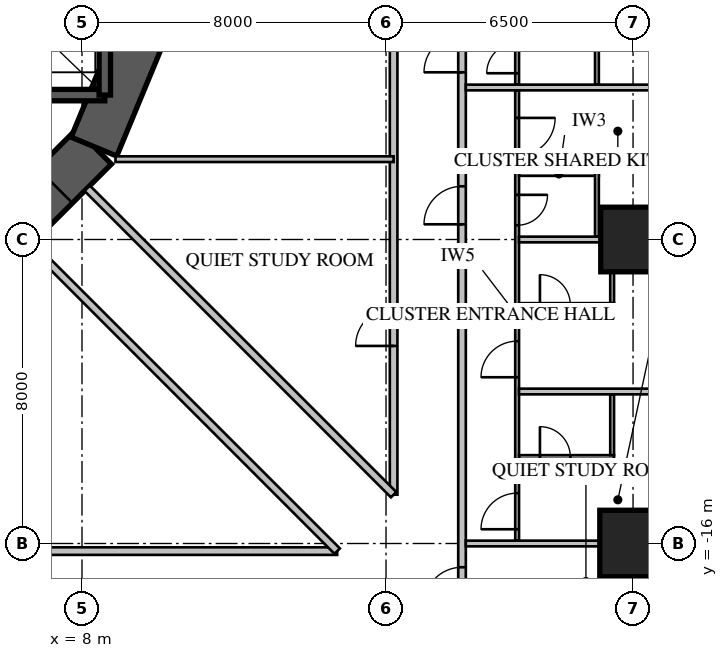
"""IFC4 building model, lengths in metres.
Left out: names, types, materials, properties, quantities, classifications, styles, units other than length and angle.
Written with IfcOpenShell. Run it as: python <this file> out.ifc"""

import sys

from ifc_helpers import new_model, si_unit, direction, frame, frame_2d, origin, origin_2d, place, context, subcontext, project, spatial, rectangle, extrude, element, fill, save


model = new_model("IFC4")
c1 = context("Model", 3, precision=1e-05, world=origin(), true_north=direction((0.0, 1.0)))
c2 = subcontext(c1, "Body", "Model", "MODEL_VIEW")
j1 = project(units=[si_unit("LENGTHUNIT", "METRE"), si_unit("PLANEANGLEUNIT", "RADIAN")], contexts=[c1])
p1 = place(None, origin())
s1 = spatial("IfcSite", under=j1, at=p1, CompositionType="ELEMENT")
p2 = place(p1, origin())
s2 = spatial("IfcBuilding", under=s1, at=p2, CompositionType="ELEMENT")
p3 = place(p2, frame((0.0, 0.0, 42.95)))
s3 = spatial("IfcBuildingStorey", under=s2, at=p3, CompositionType="ELEMENT", Elevation=42.95)
p4 = place(p3, frame((5.556, -8.315, 0.0), z_axis=(0.0, 0.0, 1.0), x_axis=(0.707106781187, 0.707106781187, 0.0)))
e1 = element("IfcWall", 1, at=p4, inside=s3, PredefinedType="SHEAR", context=c2, shape_type="SweptSolid", body=[
    extrude(rectangle(XDim=3.902, YDim=1.3, at=frame_2d((1.951, 0.0))), origin(), (0.0, 0.0, 1.0), 3.85),
])
p5 = place(p4, frame((1.451, 0.0, 0.0)))
e2 = element("IfcOpeningElement", 2, at=p5, cuts=e1, PredefinedType="OPENING", context=c2, shape_type="SweptSolid", body=[
    extrude(rectangle(XDim=1.0, YDim=2.1, at=frame_2d((0.5, 1.05))), frame((0.0, 0.67, 0.0), z_axis=(0.0, -1.0, 0.0), x_axis=(1.0, 0.0, 0.0)), (0.0, 0.0, 1.0), 1.34),
])
p6 = place(p3, frame((8.315, -5.556, 0.0), z_axis=(0.0, 0.0, 1.0), x_axis=(0.382690736062, 0.923876507187, 0.0)))
e3 = element("IfcWall", 3, at=p6, inside=s3, PredefinedType="SHEAR", context=c2, shape_type="SweptSolid", body=[
    extrude(rectangle(XDim=3.902, YDim=1.3, at=frame_2d((1.951, 0.0))), origin(), (0.0, 0.0, 1.0), 3.85),
])
p7 = place(p3, frame((5.55, -4.2, 0.0), z_axis=(0.0, 0.0, 1.0), x_axis=(1.0, 0.0, 0.0)))
e4 = element("IfcWall", 4, at=p7, inside=s3, PredefinedType="SHEAR", context=c2, shape_type="SweptSolid", body=[
    extrude(rectangle(XDim=3.05, YDim=0.3, at=frame_2d((1.525, 0.0))), origin(), (0.0, 0.0, 1.0), 3.85),
])
p8 = place(p3, frame((8.6, -4.2, 0.0), z_axis=(0.0, 0.0, 1.0), x_axis=(0.0, 1.0, 0.0)))
e5 = element("IfcWall", 5, at=p8, inside=s3, PredefinedType="SHEAR", context=c2, shape_type="SweptSolid", body=[
    extrude(rectangle(XDim=8.4, YDim=0.3, at=frame_2d((4.2, 0.0))), origin(), (0.0, 0.0, 1.0), 3.85),
])
p9 = place(p3, frame((22.5, -16.0, 0.0), z_axis=(0.0, 0.0, 1.0), x_axis=(1.0, 0.0, 0.0)))
e6 = element("IfcColumn", 6, at=p9, inside=s3, PredefinedType="COLUMN", context=c2, shape_type="SweptSolid", body=[
    extrude(rectangle(XDim=1.75, YDim=1.75, at=origin_2d()), origin(), (0.0, 0.0, 1.0), 3.85),
])
p10 = place(p3, frame((22.5, -8.0, 0.0), z_axis=(0.0, 0.0, 1.0), x_axis=(1.0, 0.0, 0.0)))
e7 = element("IfcColumn", 7, at=p10, inside=s3, PredefinedType="COLUMN", context=c2, shape_type="SweptSolid", body=[
    extrude(rectangle(XDim=1.7, YDim=1.7, at=origin_2d()), origin(), (0.0, 0.0, 1.0), 3.85),
])
p11 = place(p3, frame((18.0, -18.0, 0.0), z_axis=(0.0, 0.0, 1.0), x_axis=(0.0, 1.0, 0.0)))
e8 = element("IfcWall", 8, at=p11, inside=s3, PredefinedType="PARTITIONING", context=c2, shape_type="SweptSolid", body=[
    extrude(rectangle(XDim=36.0, YDim=0.2, at=frame_2d((18.0, 0.0))), origin(), (0.0, 0.0, 1.0), 3.65),
])
p12 = place(p11, frame((10.4, 0.0, 0.0)))
e9 = element("IfcOpeningElement", 9, at=p12, cuts=e8, PredefinedType="OPENING", context=c2, shape_type="SweptSolid", body=[
    extrude(rectangle(XDim=1.0, YDim=2.1, at=frame_2d((0.5, 1.05))), frame((0.0, 0.12, 0.0), z_axis=(0.0, -1.0, 0.0), x_axis=(1.0, 0.0, 0.0)), (0.0, 0.0, 1.0), 0.24),
])
p13 = place(p11, frame((14.4, 0.0, 0.0)))
e10 = element("IfcOpeningElement", 10, at=p13, cuts=e8, PredefinedType="OPENING", context=c2, shape_type="SweptSolid", body=[
    extrude(rectangle(XDim=1.0, YDim=2.1, at=frame_2d((0.5, 1.05))), frame((0.0, 0.12, 0.0), z_axis=(0.0, -1.0, 0.0), x_axis=(1.0, 0.0, 0.0)), (0.0, 0.0, 1.0), 0.24),
])
p14 = place(p11, frame((0.375, 0.0, 0.0)))
e11 = element("IfcOpeningElement", 11, at=p14, cuts=e8, PredefinedType="OPENING", context=c2, shape_type="SweptSolid", body=[
    extrude(rectangle(XDim=1.0, YDim=2.1, at=frame_2d((0.5, 1.05))), frame((0.0, 0.12, 0.0), z_axis=(0.0, -1.0, 0.0), x_axis=(1.0, 0.0, 0.0)), (0.0, 0.0, 1.0), 0.24),
])
p15 = place(p11, frame((34.375, 0.0, 0.0)))
e12 = element("IfcOpeningElement", 12, at=p15, cuts=e8, PredefinedType="OPENING", context=c2, shape_type="SweptSolid", body=[
    extrude(rectangle(XDim=0.95, YDim=2.1, at=frame_2d((0.475, 1.05))), frame((0.0, 0.12, 0.0), z_axis=(0.0, -1.0, 0.0), x_axis=(1.0, 0.0, 0.0)), (0.0, 0.0, 1.0), 0.24),
])
p16 = place(p3, frame((19.45, -15.925, 0.0), z_axis=(0.0, 0.0, 1.0), x_axis=(0.0, 1.0, 0.0)))
e13 = element("IfcWall", 13, at=p16, inside=s3, PredefinedType="PARTITIONING", context=c2, shape_type="SweptSolid", body=[
    extrude(rectangle(XDim=11.85, YDim=0.1, at=frame_2d((5.925, 0.0))), origin(), (0.0, 0.0, 1.0), 3.65),
])
p17 = place(p16, frame((10.125, 0.0, 0.0)))
e14 = element("IfcOpeningElement", 14, at=p17, cuts=e13, PredefinedType="OPENING", context=c2, shape_type="SweptSolid", body=[
    extrude(rectangle(XDim=1.0, YDim=2.1, at=frame_2d((0.5, 1.05))), frame((0.0, 0.07, 0.0), z_axis=(0.0, -1.0, 0.0), x_axis=(1.0, 0.0, 0.0)), (0.0, 0.0, 1.0), 0.14),
])
p18 = place(p16, frame((8.3, 0.0, 0.0)))
e15 = element("IfcOpeningElement", 15, at=p18, cuts=e13, PredefinedType="OPENING", context=c2, shape_type="SweptSolid", body=[
    extrude(rectangle(XDim=0.8, YDim=2.1, at=frame_2d((0.4, 1.05))), frame((0.0, 0.07, 0.0), z_axis=(0.0, -1.0, 0.0), x_axis=(1.0, 0.0, 0.0)), (0.0, 0.0, 1.0), 0.14),
])
p19 = place(p16, frame((0.3, 0.0, 0.0)))
e16 = element("IfcOpeningElement", 16, at=p19, cuts=e13, PredefinedType="OPENING", context=c2, shape_type="SweptSolid", body=[
    extrude(rectangle(XDim=0.95, YDim=2.1, at=frame_2d((0.475, 1.05))), frame((0.0, 0.07, 0.0), z_axis=(0.0, -1.0, 0.0), x_axis=(1.0, 0.0, 0.0)), (0.0, 0.0, 1.0), 0.14),
])
p20 = place(p16, frame((4.3, 0.0, 0.0)))
e17 = element("IfcOpeningElement", 17, at=p20, cuts=e13, PredefinedType="OPENING", context=c2, shape_type="SweptSolid", body=[
    extrude(rectangle(XDim=0.95, YDim=2.1, at=frame_2d((0.475, 1.05))), frame((0.0, 0.07, 0.0), z_axis=(0.0, -1.0, 0.0), x_axis=(1.0, 0.0, 0.0)), (0.0, 0.0, 1.0), 0.14),
])
p21 = place(p3, frame((19.5, -6.275, 0.0), z_axis=(0.0, 0.0, 1.0), x_axis=(1.0, 0.0, 0.0)))
e18 = element("IfcWall", 18, at=p21, inside=s3, PredefinedType="PARTITIONING", context=c2, shape_type="SweptSolid", body=[
    extrude(rectangle(XDim=2.1, YDim=0.1, at=frame_2d((1.05, 0.0))), origin(), (0.0, 0.0, 1.0), 3.65),
])
p22 = place(p3, frame((21.55, -7.925, 0.0), z_axis=(0.0, 0.0, 1.0), x_axis=(0.0, 1.0, 0.0)))
e19 = element("IfcWall", 19, at=p22, inside=s3, PredefinedType="PARTITIONING", context=c2, shape_type="SweptSolid", body=[
    extrude(rectangle(XDim=1.7, YDim=0.1, at=frame_2d((0.85, 0.0))), origin(), (0.0, 0.0, 1.0), 3.65),
])
p23 = place(p3, frame((19.45, -3.925, 0.0), z_axis=(0.0, 0.0, 1.0), x_axis=(0.0, 1.0, 0.0)))
e20 = element("IfcWall", 20, at=p23, inside=s3, PredefinedType="PARTITIONING", context=c2, shape_type="SweptSolid", body=[
    extrude(rectangle(XDim=19.85, YDim=0.1, at=frame_2d((9.925, 0.0))), origin(), (0.0, 0.0, 1.0), 3.65),
])
p24 = place(p23, frame((2.125, 0.0, 0.0)))
e21 = element("IfcOpeningElement", 21, at=p24, cuts=e20, PredefinedType="OPENING", context=c2, shape_type="SweptSolid", body=[
    extrude(rectangle(XDim=1.0, YDim=2.1, at=frame_2d((0.5, 1.05))), frame((0.0, 0.07, 0.0), z_axis=(0.0, -1.0, 0.0), x_axis=(1.0, 0.0, 0.0)), (0.0, 0.0, 1.0), 0.14),
])
p25 = place(p23, frame((0.3, 0.0, 0.0)))
e22 = element("IfcOpeningElement", 22, at=p25, cuts=e20, PredefinedType="OPENING", context=c2, shape_type="SweptSolid", body=[
    extrude(rectangle(XDim=0.8, YDim=2.1, at=frame_2d((0.4, 1.05))), frame((0.0, 0.07, 0.0), z_axis=(0.0, -1.0, 0.0), x_axis=(1.0, 0.0, 0.0)), (0.0, 0.0, 1.0), 0.14),
])
p26 = place(p23, frame((4.3, 0.0, 0.0)))
e23 = element("IfcOpeningElement", 23, at=p26, cuts=e20, PredefinedType="OPENING", context=c2, shape_type="SweptSolid", body=[
    extrude(rectangle(XDim=0.95, YDim=2.1, at=frame_2d((0.475, 1.05))), frame((0.0, 0.07, 0.0), z_axis=(0.0, -1.0, 0.0), x_axis=(1.0, 0.0, 0.0)), (0.0, 0.0, 1.0), 0.14),
])
p27 = place(p23, frame((8.3, 0.0, 0.0)))
e24 = element("IfcOpeningElement", 24, at=p27, cuts=e20, PredefinedType="OPENING", context=c2, shape_type="SweptSolid", body=[
    extrude(rectangle(XDim=0.95, YDim=2.1, at=frame_2d((0.475, 1.05))), frame((0.0, 0.07, 0.0), z_axis=(0.0, -1.0, 0.0), x_axis=(1.0, 0.0, 0.0)), (0.0, 0.0, 1.0), 0.14),
])
p28 = place(p23, frame((12.3, 0.0, 0.0)))
e25 = element("IfcOpeningElement", 25, at=p28, cuts=e20, PredefinedType="OPENING", context=c2, shape_type="SweptSolid", body=[
    extrude(rectangle(XDim=0.95, YDim=2.1, at=frame_2d((0.475, 1.05))), frame((0.0, 0.07, 0.0), z_axis=(0.0, -1.0, 0.0), x_axis=(1.0, 0.0, 0.0)), (0.0, 0.0, 1.0), 0.14),
])
p29 = place(p23, frame((16.3, 0.0, 0.0)))
e26 = element("IfcOpeningElement", 26, at=p29, cuts=e20, PredefinedType="OPENING", context=c2, shape_type="SweptSolid", body=[
    extrude(rectangle(XDim=0.95, YDim=2.1, at=frame_2d((0.475, 1.05))), frame((0.0, 0.07, 0.0), z_axis=(0.0, -1.0, 0.0), x_axis=(1.0, 0.0, 0.0)), (0.0, 0.0, 1.0), 0.14),
])
p30 = place(p3, frame((21.55, -3.925, 0.0), z_axis=(0.0, 0.0, 1.0), x_axis=(0.0, 1.0, 0.0)))
e27 = element("IfcWall", 27, at=p30, inside=s3, PredefinedType="PARTITIONING", context=c2, shape_type="SweptSolid", body=[
    extrude(rectangle(XDim=1.7, YDim=0.1, at=frame_2d((0.85, 0.0))), origin(), (0.0, 0.0, 1.0), 3.65),
])
p31 = place(p3, frame((18.1, -16.0, 0.0), z_axis=(0.0, 0.0, 1.0), x_axis=(1.0, 0.0, 0.0)))
e28 = element("IfcWall", 28, at=p31, inside=s3, PredefinedType="PARTITIONING", context=c2, shape_type="SweptSolid", body=[
    extrude(rectangle(XDim=6.589, YDim=0.15, at=frame_2d((3.295, 0.0))), origin(), (0.0, 0.0, 1.0), 3.65),
])
for number, where, z_axis, x_axis in (
    (29, (19.5, -12.0, 0.0), (0.0, 0.0, 1.0), (1.0, 0.0, 0.0)),
    (30, (19.5, -8.0, 0.0), (0.0, 0.0, 1.0), (1.0, 0.0, 0.0)),
):
    element("IfcWall", number, at=place(p3, frame(where, z_axis=z_axis, x_axis=x_axis)), inside=s3, PredefinedType="PARTITIONING", context=c2, shape_type="SweptSolid", body=[
        extrude(rectangle(XDim=5.2, YDim=0.15, at=frame_2d((2.6, 0.0))), origin(), (0.0, 0.0, 1.0), 3.65),
    ])
p32 = place(p3, frame((18.1, -4.0, 0.0), z_axis=(0.0, 0.0, 1.0), x_axis=(1.0, 0.0, 0.0)))
e31 = element("IfcWall", 31, at=p32, inside=s3, PredefinedType="PARTITIONING", context=c2, shape_type="SweptSolid", body=[
    extrude(rectangle(XDim=6.6, YDim=0.15, at=frame_2d((3.3, 0.0))), origin(), (0.0, 0.0, 1.0), 3.65),
])
p33 = place(p3, frame((19.5, -13.725, 0.0), z_axis=(0.0, 0.0, 1.0), x_axis=(1.0, 0.0, 0.0)))
e32 = element("IfcWall", 32, at=p33, inside=s3, PredefinedType="PARTITIONING", context=c2, shape_type="SweptSolid", body=[
    extrude(rectangle(XDim=2.5, YDim=0.1, at=frame_2d((1.25, 0.0))), origin(), (0.0, 0.0, 1.0), 3.65),
])
p34 = place(p33, frame((0.55, 0.0, 0.0)))
e33 = element("IfcOpeningElement", 33, at=p34, cuts=e32, PredefinedType="OPENING", context=c2, shape_type="SweptSolid", body=[
    extrude(rectangle(XDim=0.8, YDim=2.1, at=frame_2d((0.4, 1.05))), frame((0.0, 0.07, 0.0), z_axis=(0.0, -1.0, 0.0), x_axis=(1.0, 0.0, 0.0)), (0.0, 0.0, 1.0), 0.14),
])
p35 = place(p3, frame((21.95, -13.675, 0.0), z_axis=(0.0, 0.0, 1.0), x_axis=(0.0, 1.0, 0.0)))
e34 = element("IfcWall", 34, at=p35, inside=s3, PredefinedType="PARTITIONING", context=c2, shape_type="SweptSolid", body=[
    extrude(rectangle(XDim=1.6, YDim=0.1, at=frame_2d((0.8, 0.0))), origin(), (0.0, 0.0, 1.0), 3.65),
])
p36 = place(p3, frame((19.5, -9.725, 0.0), z_axis=(0.0, 0.0, 1.0), x_axis=(1.0, 0.0, 0.0)))
e35 = element("IfcWall", 35, at=p36, inside=s3, PredefinedType="PARTITIONING", context=c2, shape_type="SweptSolid", body=[
    extrude(rectangle(XDim=2.5, YDim=0.1, at=frame_2d((1.25, 0.0))), origin(), (0.0, 0.0, 1.0), 3.65),
])
p37 = place(p36, frame((0.55, 0.0, 0.0)))
e36 = element("IfcOpeningElement", 36, at=p37, cuts=e35, PredefinedType="OPENING", context=c2, shape_type="SweptSolid", body=[
    extrude(rectangle(XDim=0.8, YDim=2.1, at=frame_2d((0.4, 1.05))), frame((0.0, 0.07, 0.0), z_axis=(0.0, -1.0, 0.0), x_axis=(1.0, 0.0, 0.0)), (0.0, 0.0, 1.0), 0.14),
])
p38 = place(p3, frame((21.95, -9.675, 0.0), z_axis=(0.0, 0.0, 1.0), x_axis=(0.0, 1.0, 0.0)))
e37 = element("IfcWall", 37, at=p38, inside=s3, PredefinedType="PARTITIONING", context=c2, shape_type="SweptSolid", body=[
    extrude(rectangle(XDim=1.6, YDim=0.1, at=frame_2d((0.8, 0.0))), origin(), (0.0, 0.0, 1.0), 3.65),
])
p39 = place(p3, frame((16.2, -14.715, 0.0), z_axis=(0.0, 0.0, 1.0), x_axis=(0.0, 1.0, 0.0)))
e38 = element("IfcWall", 38, at=p39, inside=s3, PredefinedType="PARTITIONING", context=c2, shape_type="SweptSolid", body=[
    extrude(rectangle(XDim=29.43, YDim=0.2, at=frame_2d((14.715, 0.0))), origin(), (0.0, 0.0, 1.0), 3.65),
])
p40 = place(p39, frame((3.915, 0.0, 0.0)))
e39 = element("IfcOpeningElement", 39, at=p40, cuts=e38, PredefinedType="OPENING", context=c2, shape_type="SweptSolid", body=[
    extrude(rectangle(XDim=1.0, YDim=2.1, at=frame_2d((0.5, 1.05))), frame((0.0, 0.12, 0.0), z_axis=(0.0, -1.0, 0.0), x_axis=(1.0, 0.0, 0.0)), (0.0, 0.0, 1.0), 0.24),
])
p41 = place(p39, frame((18.63, 0.0, 0.0)))
e40 = element("IfcOpeningElement", 40, at=p41, cuts=e38, PredefinedType="OPENING", context=c2, shape_type="SweptSolid", body=[
    extrude(rectangle(XDim=1.0, YDim=2.1, at=frame_2d((0.5, 1.05))), frame((0.0, 0.12, 0.0), z_axis=(0.0, -1.0, 0.0), x_axis=(1.0, 0.0, 0.0)), (0.0, 0.0, 1.0), 0.24),
])
p42 = place(p3, frame((-14.715, -16.2, 0.0), z_axis=(0.0, 0.0, 1.0), x_axis=(1.0, 0.0, 0.0)))
e41 = element("IfcWall", 41, at=p42, inside=s3, PredefinedType="PARTITIONING", context=c2, shape_type="SweptSolid", body=[
    extrude(rectangle(XDim=29.43, YDim=0.2, at=frame_2d((14.715, 0.0))), origin(), (0.0, 0.0, 1.0), 3.65),
])
p43 = place(p42, frame((3.915, 0.0, 0.0)))
e42 = element("IfcOpeningElement", 42, at=p43, cuts=e41, PredefinedType="OPENING", context=c2, shape_type="SweptSolid", body=[
    extrude(rectangle(XDim=1.0, YDim=2.1, at=frame_2d((0.5, 1.05))), frame((0.0, 0.12, 0.0), z_axis=(0.0, -1.0, 0.0), x_axis=(1.0, 0.0, 0.0)), (0.0, 0.0, 1.0), 0.24),
])
p44 = place(p42, frame((18.63, 0.0, 0.0)))
e43 = element("IfcOpeningElement", 43, at=p44, cuts=e41, PredefinedType="OPENING", context=c2, shape_type="SweptSolid", body=[
    extrude(rectangle(XDim=1.0, YDim=2.1, at=frame_2d((0.5, 1.05))), frame((0.0, 0.12, 0.0), z_axis=(0.0, -1.0, 0.0), x_axis=(1.0, 0.0, 0.0)), (0.0, 0.0, 1.0), 0.24),
])
for number, where, z_axis, x_axis in (
    (44, (8.137, -6.652, 0.0), (0.0, 0.0, 1.0), (0.707, -0.707, 0.0)),
    (45, (6.652, -8.137, 0.0), (0.0, 0.0, 1.0), (0.707, -0.707, 0.0)),
):
    element("IfcWall", number, at=place(p3, frame(where, z_axis=z_axis, x_axis=x_axis)), inside=s3, PredefinedType="PARTITIONING", context=c2, shape_type="SweptSolid", body=[
        extrude(rectangle(XDim=11.402, YDim=0.2, at=frame_2d((5.701, 0.0))), origin(), (0.0, 0.0, 1.0), 3.65),
    ])
p45 = place(p3, frame((8.881, -5.886, 0.0), z_axis=(0.0, 0.0, 1.0), x_axis=(1.0, 0.0, 0.0)))
e46 = element("IfcWall", 46, at=p45, inside=s3, PredefinedType="PARTITIONING", context=c2, shape_type="SweptSolid", body=[
    extrude(rectangle(XDim=7.319, YDim=0.15, at=frame_2d((3.659, 0.0))), origin(), (0.0, 0.0, 1.0), 3.65),
])
p46 = place(p5, origin())
e47 = element("IfcDoor", 47, at=p46, inside=s3, OperationType="SINGLE_SWING_LEFT", PredefinedType="DOOR", context=c2, shape_type="SweptSolid", body=[
    extrude(rectangle(XDim=1.0, YDim=2.1, at=frame_2d((0.5, 1.05))), frame((0.0, 0.025, 0.0), z_axis=(0.0, -1.0, 0.0), x_axis=(1.0, 0.0, 0.0)), (0.0, 0.0, 1.0), 0.05),
])
fill(e2, e47)
p47 = place(p12, origin())
e48 = element("IfcDoor", 48, at=p47, inside=s3, OperationType="SINGLE_SWING_LEFT", PredefinedType="DOOR", context=c2, shape_type="SweptSolid", body=[
    extrude(rectangle(XDim=1.0, YDim=2.1, at=frame_2d((0.5, 1.05))), frame((0.0, 0.025, 0.0), z_axis=(0.0, -1.0, 0.0), x_axis=(1.0, 0.0, 0.0)), (0.0, 0.0, 1.0), 0.05),
])
fill(e9, e48)
p48 = place(p17, origin())
e49 = element("IfcDoor", 49, at=p48, inside=s3, OperationType="SINGLE_SWING_RIGHT", PredefinedType="DOOR", context=c2, shape_type="SweptSolid", body=[
    extrude(rectangle(XDim=1.0, YDim=2.1, at=frame_2d((0.5, 1.05))), frame((0.0, 0.025, 0.0), z_axis=(0.0, -1.0, 0.0), x_axis=(1.0, 0.0, 0.0)), (0.0, 0.0, 1.0), 0.05),
])
fill(e14, e49)
p49 = place(p18, origin())
e50 = element("IfcDoor", 50, at=p49, inside=s3, OperationType="SINGLE_SWING_RIGHT", PredefinedType="DOOR", context=c2, shape_type="SweptSolid", body=[
    extrude(rectangle(XDim=0.8, YDim=2.1, at=frame_2d((0.4, 1.05))), frame((0.0, 0.025, 0.0), z_axis=(0.0, -1.0, 0.0), x_axis=(1.0, 0.0, 0.0)), (0.0, 0.0, 1.0), 0.05),
])
fill(e15, e50)
p50 = place(p13, origin())
e51 = element("IfcDoor", 51, at=p50, inside=s3, OperationType="SINGLE_SWING_LEFT", PredefinedType="DOOR", context=c2, shape_type="SweptSolid", body=[
    extrude(rectangle(XDim=1.0, YDim=2.1, at=frame_2d((0.5, 1.05))), frame((0.0, 0.025, 0.0), z_axis=(0.0, -1.0, 0.0), x_axis=(1.0, 0.0, 0.0)), (0.0, 0.0, 1.0), 0.05),
])
fill(e10, e51)
p51 = place(p25, origin())
e52 = element("IfcDoor", 52, at=p51, inside=s3, OperationType="SINGLE_SWING_LEFT", PredefinedType="DOOR", context=c2, shape_type="SweptSolid", body=[
    extrude(rectangle(XDim=0.8, YDim=2.1, at=frame_2d((0.4, 1.05))), frame((0.0, 0.025, 0.0), z_axis=(0.0, -1.0, 0.0), x_axis=(1.0, 0.0, 0.0)), (0.0, 0.0, 1.0), 0.05),
])
fill(e22, e52)
p52 = place(p14, origin())
e53 = element("IfcDoor", 53, at=p52, inside=s3, OperationType="SINGLE_SWING_LEFT", PredefinedType="DOOR", context=c2, shape_type="SweptSolid", body=[
    extrude(rectangle(XDim=1.0, YDim=2.1, at=frame_2d((0.5, 1.05))), frame((0.0, 0.025, 0.0), z_axis=(0.0, -1.0, 0.0), x_axis=(1.0, 0.0, 0.0)), (0.0, 0.0, 1.0), 0.05),
])
fill(e11, e53)
p53 = place(p19, origin())
e54 = element("IfcDoor", 54, at=p53, inside=s3, OperationType="SINGLE_SWING_LEFT", PredefinedType="DOOR", context=c2, shape_type="SweptSolid", body=[
    extrude(rectangle(XDim=0.95, YDim=2.1, at=frame_2d((0.475, 1.05))), frame((0.0, 0.025, 0.0), z_axis=(0.0, -1.0, 0.0), x_axis=(1.0, 0.0, 0.0)), (0.0, 0.0, 1.0), 0.05),
])
fill(e16, e54)
p54 = place(p34, origin())
e55 = element("IfcDoor", 55, at=p54, inside=s3, OperationType="SINGLE_SWING_LEFT", PredefinedType="DOOR", context=c2, shape_type="SweptSolid", body=[
    extrude(rectangle(XDim=0.8, YDim=2.1, at=frame_2d((0.4, 1.05))), frame((0.0, 0.025, 0.0), z_axis=(0.0, -1.0, 0.0), x_axis=(1.0, 0.0, 0.0)), (0.0, 0.0, 1.0), 0.05),
])
fill(e33, e55)
p55 = place(p20, origin())
e56 = element("IfcDoor", 56, at=p55, inside=s3, OperationType="SINGLE_SWING_LEFT", PredefinedType="DOOR", context=c2, shape_type="SweptSolid", body=[
    extrude(rectangle(XDim=0.95, YDim=2.1, at=frame_2d((0.475, 1.05))), frame((0.0, 0.025, 0.0), z_axis=(0.0, -1.0, 0.0), x_axis=(1.0, 0.0, 0.0)), (0.0, 0.0, 1.0), 0.05),
])
fill(e17, e56)
p56 = place(p37, origin())
e57 = element("IfcDoor", 57, at=p56, inside=s3, OperationType="SINGLE_SWING_LEFT", PredefinedType="DOOR", context=c2, shape_type="SweptSolid", body=[
    extrude(rectangle(XDim=0.8, YDim=2.1, at=frame_2d((0.4, 1.05))), frame((0.0, 0.025, 0.0), z_axis=(0.0, -1.0, 0.0), x_axis=(1.0, 0.0, 0.0)), (0.0, 0.0, 1.0), 0.05),
])
fill(e36, e57)
p57 = place(p40, origin())
e58 = element("IfcDoor", 58, at=p57, inside=s3, OperationType="SINGLE_SWING_LEFT", PredefinedType="DOOR", context=c2, shape_type="SweptSolid", body=[
    extrude(rectangle(XDim=1.0, YDim=2.1, at=frame_2d((0.5, 1.05))), frame((0.0, 0.025, 0.0), z_axis=(0.0, -1.0, 0.0), x_axis=(1.0, 0.0, 0.0)), (0.0, 0.0, 1.0), 0.05),
])
fill(e39, e58)
save(model, sys.argv[1])
